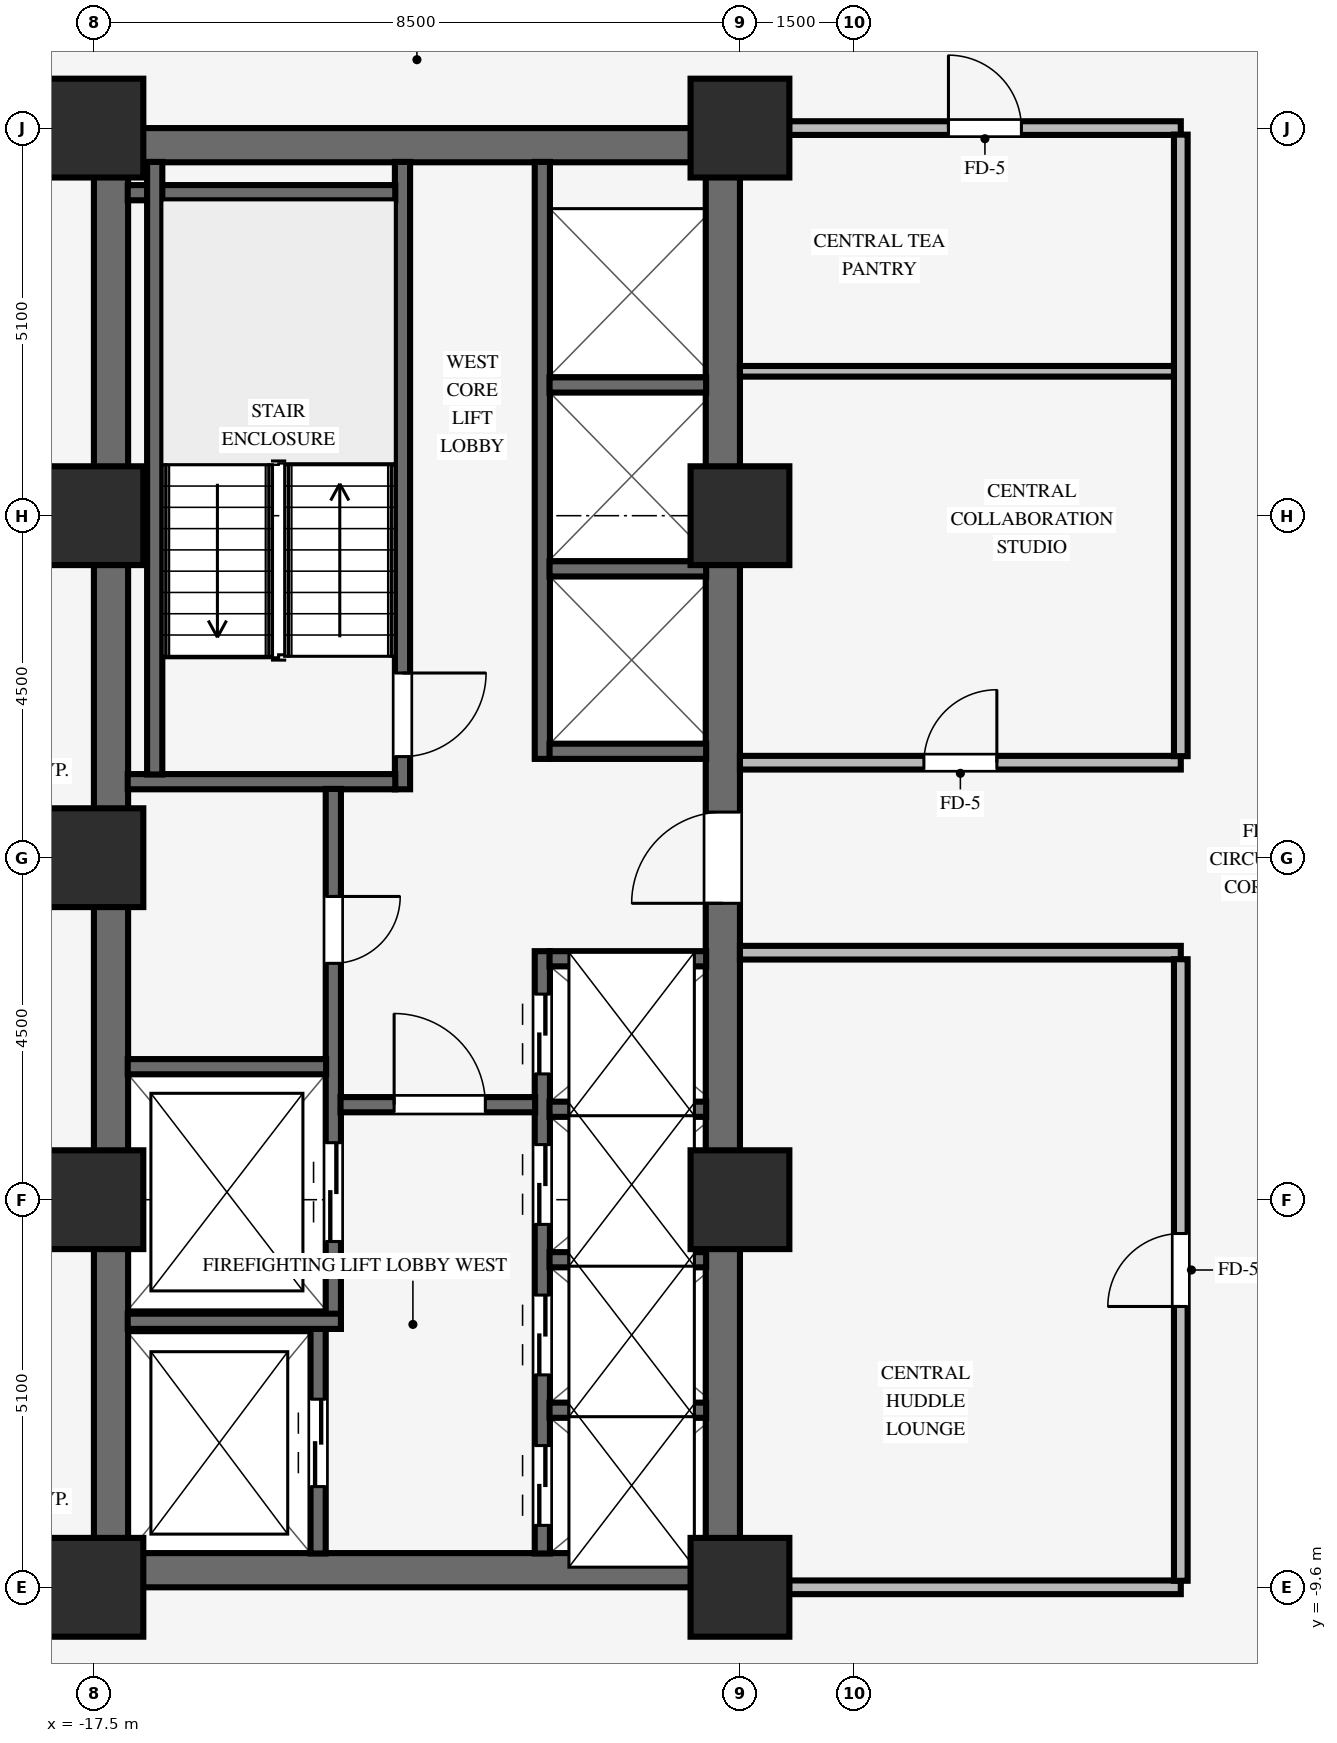
"""IFC4 building model, lengths in metres.
Left out: names, types, materials, properties, quantities, classifications, styles, units other than length and angle.
Written with IfcOpenShell. Run it as: python <this file> out.ifc"""

import sys

from ifc_helpers import new_model, si_unit, direction, frame, frame_2d, origin, origin_2d, place, context, subcontext, project, spatial, rectangle, extrude, source, transform, mapped, element, fill, save


model = new_model("IFC4")
c1 = context("Model", 3, precision=1e-05, world=origin(), true_north=direction((0.0, 1.0)))
c2 = subcontext(c1, "Body", "Model", "MODEL_VIEW")
j1 = project(units=[si_unit("LENGTHUNIT", "METRE"), si_unit("PLANEANGLEUNIT", "RADIAN")], contexts=[c1])
p1 = place(None, origin())
s1 = spatial("IfcSite", under=j1, at=p1, CompositionType="ELEMENT")
p2 = place(p1, origin())
s2 = spatial("IfcBuilding", under=s1, at=p2, CompositionType="ELEMENT")
p3 = place(p2, frame((0.0, 0.0, 31.25)))
s3 = spatial("IfcBuildingStorey", under=s2, at=p3, CompositionType="ELEMENT", Elevation=31.25)
for number, where, z_axis, x_axis in (
    (1, (-17.5, -9.375, 0.0), (0.0, 0.0, 1.0), (1.0, 0.0, 0.0)),
    (2, (-17.5, 9.375, 0.0), (0.0, 0.0, 1.0), (1.0, 0.0, 0.0)),
):
    element("IfcWall", number, at=place(p3, frame(where, z_axis=z_axis, x_axis=x_axis)), inside=s3, PredefinedType="SHEAR", context=c2, shape_type="SweptSolid", body=[
        extrude(rectangle(XDim=8.5, YDim=0.45, at=frame_2d((4.25, 0.0))), origin(), (0.0, 0.0, 1.0), 3.37),
    ])
p4 = place(p3, frame((-17.275, -9.155, 0.0), z_axis=(0.0, 0.0, 1.0), x_axis=(0.0, 1.0, 0.0)))
e3 = element("IfcWall", 3, at=p4, inside=s3, PredefinedType="SHEAR", context=c2, shape_type="SweptSolid", body=[
    extrude(rectangle(XDim=18.31, YDim=0.45, at=frame_2d((9.155, 0.0))), origin(), (0.0, 0.0, 1.0), 3.37),
])
p5 = place(p3, frame((-9.225, -9.155, 0.0), z_axis=(0.0, 0.0, 1.0), x_axis=(0.0, 1.0, 0.0)))
e4 = element("IfcWall", 4, at=p5, inside=s3, PredefinedType="SHEAR", context=c2, shape_type="SweptSolid", body=[
    extrude(rectangle(XDim=18.31, YDim=0.45, at=frame_2d((9.155, 0.0))), origin(), (0.0, 0.0, 1.0), 3.37),
])
p6 = place(p5, frame((8.555, 0.0, 0.0)))
e5 = element("IfcOpeningElement", 5, at=p6, cuts=e4, PredefinedType="OPENING", context=c2, shape_type="SweptSolid", body=[
    extrude(rectangle(XDim=1.2, YDim=2.15, at=frame_2d((0.6, 1.075))), frame((0.0, 0.235, 0.0), z_axis=(0.0, -1.0, 0.0), x_axis=(1.0, 0.0, 0.0)), (0.0, 0.0, 1.0), 0.47),
])
for number, where, z_axis, x_axis in (
    (6, (-17.5, -9.6, 0.0), (0.0, 0.0, 1.0), (1.0, 0.0, 0.0)),
    (7, (-17.5, -4.5, 0.0), (0.0, 0.0, 1.0), (1.0, 0.0, 0.0)),
    (8, (-17.5, 4.5, 0.0), (0.0, 0.0, 1.0), (1.0, 0.0, 0.0)),
    (9, (-17.5, 9.6, 0.0), (0.0, 0.0, 1.0), (1.0, 0.0, 0.0)),
    (10, (-9.0, -9.6, 0.0), (0.0, 0.0, 1.0), (1.0, 0.0, 0.0)),
    (11, (-9.0, -4.5, 0.0), (0.0, 0.0, 1.0), (1.0, 0.0, 0.0)),
    (12, (-9.0, 4.5, 0.0), (0.0, 0.0, 1.0), (1.0, 0.0, 0.0)),
    (13, (-9.0, 9.6, 0.0), (0.0, 0.0, 1.0), (1.0, 0.0, 0.0)),
    (14, (-17.5, 0.0, 0.0), (0.0, 0.0, 1.0), (1.0, 0.0, 0.0)),
):
    element("IfcColumn", number, at=place(p3, frame(where, z_axis=z_axis, x_axis=x_axis)), inside=s3, PredefinedType="COLUMN", context=c2, shape_type="SweptSolid", body=[
        extrude(rectangle(XDim=1.3, YDim=1.3, at=origin_2d()), origin(), (0.0, 0.0, 1.0), 3.37),
    ])
p7 = place(p3, frame((-13.44, 0.9, 0.0), z_axis=(0.0, 0.0, 1.0), x_axis=(0.0, 1.0, 0.0)))
e15 = element("IfcWall", 15, at=p7, inside=s3, PredefinedType="SHEAR", context=c2, shape_type="SweptSolid", body=[
    extrude(rectangle(XDim=8.255, YDim=0.2, at=frame_2d((4.127, 0.0))), origin(), (0.0, 0.0, 1.0), 3.37),
])
p8 = place(p7, frame((1.53, 0.0, 0.0), z_axis=(0.0, 0.0, 1.0), x_axis=(-1.0, 0.0, 0.0)))
e16 = element("IfcOpeningElement", 16, at=p8, cuts=e15, PredefinedType="OPENING", context=c2, shape_type="SweptSolid", body=[
    extrude(rectangle(XDim=1.1, YDim=2.15, at=frame_2d((0.55, 1.075))), frame((0.0, 0.11, 0.0), z_axis=(0.0, -1.0, 0.0), x_axis=(1.0, 0.0, 0.0)), (0.0, 0.0, 1.0), 0.22),
])
for number, where, z_axis, x_axis in (
    (17, (-17.055, 1.0, 0.0), (0.0, 0.0, 1.0), (1.0, 0.0, 0.0)),
    (18, (-17.055, 8.75, 0.0), (0.0, 0.0, 1.0), (1.0, 0.0, 0.0)),
):
    element("IfcWall", number, at=place(p3, frame(where, z_axis=z_axis, x_axis=x_axis)), inside=s3, PredefinedType="SHEAR", context=c2, shape_type="SweptSolid", body=[
        extrude(rectangle(XDim=3.52, YDim=0.2, at=frame_2d((1.76, 0.0))), origin(), (0.0, 0.0, 1.0), 3.37),
    ])
p9 = place(p3, frame((-16.7, 1.095, 0.0), z_axis=(0.0, 0.0, 1.0), x_axis=(0.0, 1.0, 0.0)))
e19 = element("IfcWall", 19, at=p9, inside=s3, PredefinedType="SHEAR", context=c2, shape_type="SweptSolid", body=[
    extrude(rectangle(XDim=8.06, YDim=0.2, at=frame_2d((4.03, 0.0))), origin(), (0.0, 0.0, 1.0), 3.37),
])
p10 = place(p3, frame((-14.55, -9.155, 0.0), z_axis=(0.0, 0.0, 1.0), x_axis=(0.0, 1.0, 0.0)))
e20 = element("IfcWall", 20, at=p10, inside=s3, PredefinedType="SHEAR", context=c2, shape_type="SweptSolid", body=[
    extrude(rectangle(XDim=2.96, YDim=0.2, at=frame_2d((1.48, 0.0))), origin(), (0.0, 0.0, 1.0), 3.37),
])
p11 = place(p10, frame((0.88, 0.0, 0.0)))
e21 = element("IfcOpeningElement", 21, at=p11, cuts=e20, PredefinedType="OPENING", context=c2, shape_type="SweptSolid", body=[
    extrude(rectangle(XDim=1.15, YDim=2.15, at=frame_2d((0.575, 1.075))), frame((0.0, 0.11, 0.0), z_axis=(0.0, -1.0, 0.0), x_axis=(1.0, 0.0, 0.0)), (0.0, 0.0, 1.0), 0.22),
])
p12 = place(p3, frame((-14.35, -6.2, 0.0), z_axis=(0.0, 0.0, 1.0), x_axis=(0.0, 1.0, 0.0)))
e22 = element("IfcWall", 22, at=p12, inside=s3, PredefinedType="SHEAR", context=c2, shape_type="SweptSolid", body=[
    extrude(rectangle(XDim=7.105, YDim=0.2, at=frame_2d((3.552, 0.0))), origin(), (0.0, 0.0, 1.0), 3.37),
])
p13 = place(p12, frame((5.69, 0.0, 0.0), z_axis=(0.0, 0.0, 1.0), x_axis=(-1.0, 0.0, 0.0)))
e23 = element("IfcOpeningElement", 23, at=p13, cuts=e22, PredefinedType="OPENING", context=c2, shape_type="SweptSolid", body=[
    extrude(rectangle(XDim=0.88, YDim=2.1, at=frame_2d((0.44, 1.05))), frame((0.0, 0.11, 0.0), z_axis=(0.0, -1.0, 0.0), x_axis=(1.0, 0.0, 0.0)), (0.0, 0.0, 1.0), 0.22),
])
p14 = place(p12, frame((1.15, 0.0, 0.0)))
e24 = element("IfcOpeningElement", 24, at=p14, cuts=e22, PredefinedType="OPENING", context=c2, shape_type="SweptSolid", body=[
    extrude(rectangle(XDim=1.3, YDim=2.2, at=frame_2d((0.65, 1.1))), frame((0.0, 0.11, 0.0), z_axis=(0.0, -1.0, 0.0), x_axis=(1.0, 0.0, 0.0)), (0.0, 0.0, 1.0), 0.22),
])
p15 = place(p3, frame((-17.055, -6.1, 0.0), z_axis=(0.0, 0.0, 1.0), x_axis=(1.0, 0.0, 0.0)))
e25 = element("IfcWall", 25, at=p15, inside=s3, PredefinedType="SHEAR", context=c2, shape_type="SweptSolid", body=[
    extrude(rectangle(XDim=2.805, YDim=0.2, at=frame_2d((1.402, 0.0))), origin(), (0.0, 0.0, 1.0), 3.37),
])
p16 = place(p3, frame((-17.055, -2.75, 0.0), z_axis=(0.0, 0.0, 1.0), x_axis=(1.0, 0.0, 0.0)))
e26 = element("IfcWall", 26, at=p16, inside=s3, PredefinedType="SHEAR", context=c2, shape_type="SweptSolid", body=[
    extrude(rectangle(XDim=2.61, YDim=0.2, at=frame_2d((1.305, 0.0))), origin(), (0.0, 0.0, 1.0), 3.37),
])
p17 = place(p3, frame((-11.6, -9.155, 0.0), z_axis=(0.0, 0.0, 1.0), x_axis=(0.0, 1.0, 0.0)))
e27 = element("IfcWall", 27, at=p17, inside=s3, PredefinedType="SHEAR", context=c2, shape_type="SweptSolid", body=[
    extrude(rectangle(XDim=7.925, YDim=0.2, at=frame_2d((3.962, 0.0))), origin(), (0.0, 0.0, 1.0), 3.37),
])
p18 = place(p17, frame((0.37, 0.0, 0.0)))
e28 = element("IfcOpeningElement", 28, at=p18, cuts=e27, PredefinedType="OPENING", context=c2, shape_type="SweptSolid", body=[
    extrude(rectangle(XDim=1.05, YDim=2.15, at=frame_2d((0.525, 1.075))), frame((0.0, 0.11, 0.0), z_axis=(0.0, -1.0, 0.0), x_axis=(1.0, 0.0, 0.0)), (0.0, 0.0, 1.0), 0.22),
])
p19 = place(p17, frame((2.35, 0.0, 0.0)))
e29 = element("IfcOpeningElement", 29, at=p19, cuts=e27, PredefinedType="OPENING", context=c2, shape_type="SweptSolid", body=[
    extrude(rectangle(XDim=1.05, YDim=2.15, at=frame_2d((0.525, 1.075))), frame((0.0, 0.11, 0.0), z_axis=(0.0, -1.0, 0.0), x_axis=(1.0, 0.0, 0.0)), (0.0, 0.0, 1.0), 0.22),
])
p20 = place(p17, frame((4.33, 0.0, 0.0)))
e30 = element("IfcOpeningElement", 30, at=p20, cuts=e27, PredefinedType="OPENING", context=c2, shape_type="SweptSolid", body=[
    extrude(rectangle(XDim=1.05, YDim=2.15, at=frame_2d((0.525, 1.075))), frame((0.0, 0.11, 0.0), z_axis=(0.0, -1.0, 0.0), x_axis=(1.0, 0.0, 0.0)), (0.0, 0.0, 1.0), 0.22),
])
p21 = place(p17, frame((6.31, 0.0, 0.0)))
e31 = element("IfcOpeningElement", 31, at=p21, cuts=e27, PredefinedType="OPENING", context=c2, shape_type="SweptSolid", body=[
    extrude(rectangle(XDim=1.05, YDim=2.15, at=frame_2d((0.525, 1.075))), frame((0.0, 0.11, 0.0), z_axis=(0.0, -1.0, 0.0), x_axis=(1.0, 0.0, 0.0)), (0.0, 0.0, 1.0), 0.22),
])
p22 = place(p3, frame((-14.255, -3.25, 0.0), z_axis=(0.0, 0.0, 1.0), x_axis=(1.0, 0.0, 0.0)))
e32 = element("IfcWall", 32, at=p22, inside=s3, PredefinedType="SHEAR", context=c2, shape_type="SweptSolid", body=[
    extrude(rectangle(XDim=2.56, YDim=0.2, at=frame_2d((1.28, 0.0))), origin(), (0.0, 0.0, 1.0), 3.37),
])
p23 = place(p22, frame((0.705, 0.0, 0.0)))
e33 = element("IfcOpeningElement", 33, at=p23, cuts=e32, PredefinedType="OPENING", context=c2, shape_type="SweptSolid", body=[
    extrude(rectangle(XDim=1.2, YDim=2.15, at=frame_2d((0.6, 1.075))), frame((0.0, 0.11, 0.0), z_axis=(0.0, -1.0, 0.0), x_axis=(1.0, 0.0, 0.0)), (0.0, 0.0, 1.0), 0.22),
])
for number, where, z_axis, x_axis in (
    (34, (-11.505, -7.27, 0.0), (0.0, 0.0, 1.0), (1.0, 0.0, 0.0)),
    (35, (-11.505, -5.29, 0.0), (0.0, 0.0, 1.0), (1.0, 0.0, 0.0)),
    (36, (-11.505, -3.31, 0.0), (0.0, 0.0, 1.0), (1.0, 0.0, 0.0)),
    (37, (-11.505, -1.33, 0.0), (0.0, 0.0, 1.0), (1.0, 0.0, 0.0)),
):
    element("IfcWall", number, at=place(p3, frame(where, z_axis=z_axis, x_axis=x_axis)), inside=s3, PredefinedType="SHEAR", context=c2, shape_type="SweptSolid", body=[
        extrude(rectangle(XDim=2.06, YDim=0.2, at=frame_2d((1.03, 0.0))), origin(), (0.0, 0.0, 1.0), 3.37),
    ])
p24 = place(p3, frame((-11.6, 1.3, 0.0), z_axis=(0.0, 0.0, 1.0), x_axis=(0.0, 1.0, 0.0)))
e38 = element("IfcWall", 38, at=p24, inside=s3, PredefinedType="SHEAR", context=c2, shape_type="SweptSolid", body=[
    extrude(rectangle(XDim=7.855, YDim=0.2, at=frame_2d((3.927, 0.0))), origin(), (0.0, 0.0, 1.0), 3.37),
])
for number, where, z_axis, x_axis in (
    (39, (-11.505, 1.4, 0.0), (0.0, 0.0, 1.0), (1.0, 0.0, 0.0)),
    (40, (-11.505, 3.8, 0.0), (0.0, 0.0, 1.0), (1.0, 0.0, 0.0)),
    (41, (-11.505, 6.22, 0.0), (0.0, 0.0, 1.0), (1.0, 0.0, 0.0)),
):
    element("IfcWall", number, at=place(p3, frame(where, z_axis=z_axis, x_axis=x_axis)), inside=s3, PredefinedType="SHEAR", context=c2, shape_type="SweptSolid", body=[
        extrude(rectangle(XDim=2.06, YDim=0.2, at=frame_2d((1.03, 0.0))), origin(), (0.0, 0.0, 1.0), 3.37),
    ])
p25 = place(p3, frame((-8.354, -9.6, 0.0), z_axis=(0.0, 0.0, 1.0), x_axis=(1.0, 0.0, 0.0)))
e42 = element("IfcWall", 42, at=p25, inside=s3, PredefinedType="PARTITIONING", context=c2, shape_type="SweptSolid", body=[
    extrude(rectangle(XDim=5.154, YDim=0.18, at=frame_2d((2.577, 0.0))), origin(), (0.0, 0.0, 1.0), 2.405),
])
p26 = place(p3, frame((-9.0, -1.25, 0.0), z_axis=(0.0, 0.0, 1.0), x_axis=(1.0, 0.0, 0.0)))
e43 = element("IfcWall", 43, at=p26, inside=s3, PredefinedType="PARTITIONING", context=c2, shape_type="SweptSolid", body=[
    extrude(rectangle(XDim=5.8, YDim=0.18, at=frame_2d((2.9, 0.0))), origin(), (0.0, 0.0, 1.0), 3.36),
])
p27 = place(p3, frame((-9.0, 1.25, 0.0), z_axis=(0.0, 0.0, 1.0), x_axis=(1.0, 0.0, 0.0)))
e44 = element("IfcWall", 44, at=p27, inside=s3, PredefinedType="PARTITIONING", context=c2, shape_type="SweptSolid", body=[
    extrude(rectangle(XDim=5.8, YDim=0.18, at=frame_2d((2.9, 0.0))), origin(), (0.0, 0.0, 1.0), 3.36),
])
p28 = place(p27, frame((2.42, 0.0, 0.0)))
e45 = element("IfcOpeningElement", 45, at=p28, cuts=e44, PredefinedType="OPENING", context=c2, shape_type="SweptSolid", body=[
    extrude(rectangle(XDim=0.96, YDim=2.1, at=frame_2d((0.48, 1.05))), frame((0.0, 0.1, 0.0), z_axis=(0.0, -1.0, 0.0), x_axis=(1.0, 0.0, 0.0)), (0.0, 0.0, 1.0), 0.2),
])
p29 = place(p3, frame((-9.0, 6.4, 0.0), z_axis=(0.0, 0.0, 1.0), x_axis=(1.0, 0.0, 0.0)))
e46 = element("IfcWall", 46, at=p29, inside=s3, PredefinedType="PARTITIONING", context=c2, shape_type="SweptSolid", body=[
    extrude(rectangle(XDim=5.714, YDim=0.14, at=frame_2d((2.857, 0.0))), origin(), (0.0, 0.0, 1.0), 3.36),
])
p30 = place(p3, frame((-8.354, 9.6, 0.0), z_axis=(0.0, 0.0, 1.0), x_axis=(1.0, 0.0, 0.0)))
e47 = element("IfcWall", 47, at=p30, inside=s3, PredefinedType="PARTITIONING", context=c2, shape_type="SweptSolid", body=[
    extrude(rectangle(XDim=5.154, YDim=0.18, at=frame_2d((2.577, 0.0))), origin(), (0.0, 0.0, 1.0), 2.405),
])
p31 = place(p30, frame((2.097, 0.0, 0.0)))
e48 = element("IfcOpeningElement", 48, at=p31, cuts=e47, PredefinedType="OPENING", context=c2, shape_type="SweptSolid", body=[
    extrude(rectangle(XDim=0.96, YDim=2.1, at=frame_2d((0.48, 1.05))), frame((0.0, 0.1, 0.0), z_axis=(0.0, -1.0, 0.0), x_axis=(1.0, 0.0, 0.0)), (0.0, 0.0, 1.0), 0.2),
])
p32 = place(p3, frame((-3.2, -9.514, 0.0), z_axis=(0.0, 0.0, 1.0), x_axis=(0.0, 1.0, 0.0)))
e49 = element("IfcWall", 49, at=p32, inside=s3, PredefinedType="PARTITIONING", context=c2, shape_type="SweptSolid", body=[
    extrude(rectangle(XDim=8.178, YDim=0.18, at=frame_2d((4.089, 0.0))), origin(), (0.0, 0.0, 1.0), 3.36),
])
p33 = place(p32, frame((3.609, 0.0, 0.0)))
e50 = element("IfcOpeningElement", 50, at=p33, cuts=e49, PredefinedType="OPENING", context=c2, shape_type="SweptSolid", body=[
    extrude(rectangle(XDim=0.96, YDim=2.1, at=frame_2d((0.48, 1.05))), frame((0.0, 0.1, 0.0), z_axis=(0.0, -1.0, 0.0), x_axis=(1.0, 0.0, 0.0)), (0.0, 0.0, 1.0), 0.2),
])
p34 = place(p3, frame((-3.2, 1.336, 0.0), z_axis=(0.0, 0.0, 1.0), x_axis=(0.0, 1.0, 0.0)))
e51 = element("IfcWall", 51, at=p34, inside=s3, PredefinedType="PARTITIONING", context=c2, shape_type="SweptSolid", body=[
    extrude(rectangle(XDim=8.178, YDim=0.18, at=frame_2d((4.089, 0.0))), origin(), (0.0, 0.0, 1.0), 3.36),
])
m1 = source(origin(), c2, "Body", "SweptSolid", [
    extrude(rectangle(XDim=1.1, YDim=2.15, at=frame_2d((0.55, 1.075))), frame((0.0, 0.025, 0.0), z_axis=(0.0, -1.0, 0.0), x_axis=(1.0, 0.0, 0.0)), (0.0, 0.0, 1.0), 0.05),
])
p35 = place(p8, origin())
e52 = element("IfcDoor", 52, at=p35, inside=s3, OperationType="SINGLE_SWING_LEFT", PredefinedType="DOOR", context=c2, shape_type="MappedRepresentation", body=[
    mapped(m1, transform((0.0, 0.0, 0.0), scale=1.0)),
])
fill(e16, e52)
m2 = source(origin(), c2, "Body", "SweptSolid", [
    extrude(rectangle(XDim=0.88, YDim=2.1, at=frame_2d((0.44, 1.05))), frame((0.0, 0.025, 0.0), z_axis=(0.0, -1.0, 0.0), x_axis=(1.0, 0.0, 0.0)), (0.0, 0.0, 1.0), 0.05),
])
p36 = place(p13, origin())
e53 = element("IfcDoor", 53, at=p36, inside=s3, OperationType="SINGLE_SWING_LEFT", PredefinedType="DOOR", context=c2, shape_type="MappedRepresentation", body=[
    mapped(m2, transform((0.0, 0.0, 0.0), scale=1.0)),
])
fill(e23, e53)
m3 = source(origin(), c2, "Body", "SweptSolid", [
    extrude(rectangle(XDim=1.2, YDim=2.15, at=frame_2d((0.6, 1.075))), frame((0.0, 0.025, 0.0), z_axis=(0.0, -1.0, 0.0), x_axis=(1.0, 0.0, 0.0)), (0.0, 0.0, 1.0), 0.05),
])
p37 = place(p23, origin())
e54 = element("IfcDoor", 54, at=p37, inside=s3, OperationType="SINGLE_SWING_LEFT", PredefinedType="DOOR", context=c2, shape_type="MappedRepresentation", body=[
    mapped(m3, transform((0.0, 0.0, 0.0), scale=1.0)),
])
fill(e33, e54)
p38 = place(p6, origin())
e55 = element("IfcDoor", 55, at=p38, inside=s3, OperationType="SINGLE_SWING_LEFT", PredefinedType="DOOR", context=c2, shape_type="MappedRepresentation", body=[
    mapped(m3, transform((0.0, 0.0, 0.0), scale=1.0)),
])
fill(e5, e55)
m4 = source(origin(), c2, "Body", "SweptSolid", [
    extrude(rectangle(XDim=1.15, YDim=2.15, at=frame_2d((0.575, 1.075))), frame((0.0, 0.025, 0.0), z_axis=(0.0, -1.0, 0.0), x_axis=(1.0, 0.0, 0.0)), (0.0, 0.0, 1.0), 0.05),
])
p39 = place(p11, origin())
e56 = element("IfcDoor", 56, at=p39, inside=s3, OperationType="DOUBLE_DOOR_SLIDING", PredefinedType="DOOR", context=c2, shape_type="MappedRepresentation", body=[
    mapped(m4, transform((0.0, 0.0, 0.0), scale=1.0)),
])
fill(e21, e56)
m5 = source(origin(), c2, "Body", "SweptSolid", [
    extrude(rectangle(XDim=1.3, YDim=2.2, at=frame_2d((0.65, 1.1))), frame((0.0, 0.025, 0.0), z_axis=(0.0, -1.0, 0.0), x_axis=(1.0, 0.0, 0.0)), (0.0, 0.0, 1.0), 0.05),
])
p40 = place(p14, origin())
e57 = element("IfcDoor", 57, at=p40, inside=s3, OperationType="DOUBLE_DOOR_SLIDING", PredefinedType="DOOR", context=c2, shape_type="MappedRepresentation", body=[
    mapped(m5, transform((0.0, 0.0, 0.0), scale=1.0)),
])
fill(e24, e57)
m6 = source(origin(), c2, "Body", "SweptSolid", [
    extrude(rectangle(XDim=1.05, YDim=2.15, at=frame_2d((0.525, 1.075))), frame((0.0, 0.025, 0.0), z_axis=(0.0, -1.0, 0.0), x_axis=(1.0, 0.0, 0.0)), (0.0, 0.0, 1.0), 0.05),
])
p41 = place(p18, origin())
e58 = element("IfcDoor", 58, at=p41, inside=s3, OperationType="DOUBLE_DOOR_SLIDING", PredefinedType="DOOR", context=c2, shape_type="MappedRepresentation", body=[
    mapped(m6, transform((0.0, 0.0, 0.0), scale=1.0)),
])
fill(e28, e58)
p42 = place(p19, origin())
e59 = element("IfcDoor", 59, at=p42, inside=s3, OperationType="DOUBLE_DOOR_SLIDING", PredefinedType="DOOR", context=c2, shape_type="MappedRepresentation", body=[
    mapped(m6, transform((0.0, 0.0, 0.0), scale=1.0)),
])
fill(e29, e59)
p43 = place(p20, origin())
e60 = element("IfcDoor", 60, at=p43, inside=s3, OperationType="DOUBLE_DOOR_SLIDING", PredefinedType="DOOR", context=c2, shape_type="MappedRepresentation", body=[
    mapped(m6, transform((0.0, 0.0, 0.0), scale=1.0)),
])
fill(e30, e60)
p44 = place(p21, origin())
e61 = element("IfcDoor", 61, at=p44, inside=s3, OperationType="DOUBLE_DOOR_SLIDING", PredefinedType="DOOR", context=c2, shape_type="MappedRepresentation", body=[
    mapped(m6, transform((0.0, 0.0, 0.0), scale=1.0)),
])
fill(e31, e61)
m7 = source(origin(), c2, "Body", "SweptSolid", [
    extrude(rectangle(XDim=0.96, YDim=2.1, at=frame_2d((0.48, 1.05))), frame((0.0, 0.025, 0.0), z_axis=(0.0, -1.0, 0.0), x_axis=(1.0, 0.0, 0.0)), (0.0, 0.0, 1.0), 0.05),
])
p45 = place(p33, origin())
e62 = element("IfcDoor", 62, at=p45, inside=s3, OperationType="SINGLE_SWING_LEFT", PredefinedType="DOOR", context=c2, shape_type="MappedRepresentation", body=[
    mapped(m7, transform((0.0, 0.0, 0.0), scale=1.0)),
])
fill(e50, e62)
p46 = place(p28, origin())
e63 = element("IfcDoor", 63, at=p46, inside=s3, OperationType="SINGLE_SWING_RIGHT", PredefinedType="DOOR", context=c2, shape_type="MappedRepresentation", body=[
    mapped(m7, transform((0.0, 0.0, 0.0), scale=1.0)),
])
fill(e45, e63)
p47 = place(p31, origin())
e64 = element("IfcDoor", 64, at=p47, inside=s3, OperationType="SINGLE_SWING_LEFT", PredefinedType="DOOR", context=c2, shape_type="MappedRepresentation", body=[
    mapped(m7, transform((0.0, 0.0, 0.0), scale=1.0)),
])
fill(e48, e64)
save(model, sys.argv[1])
